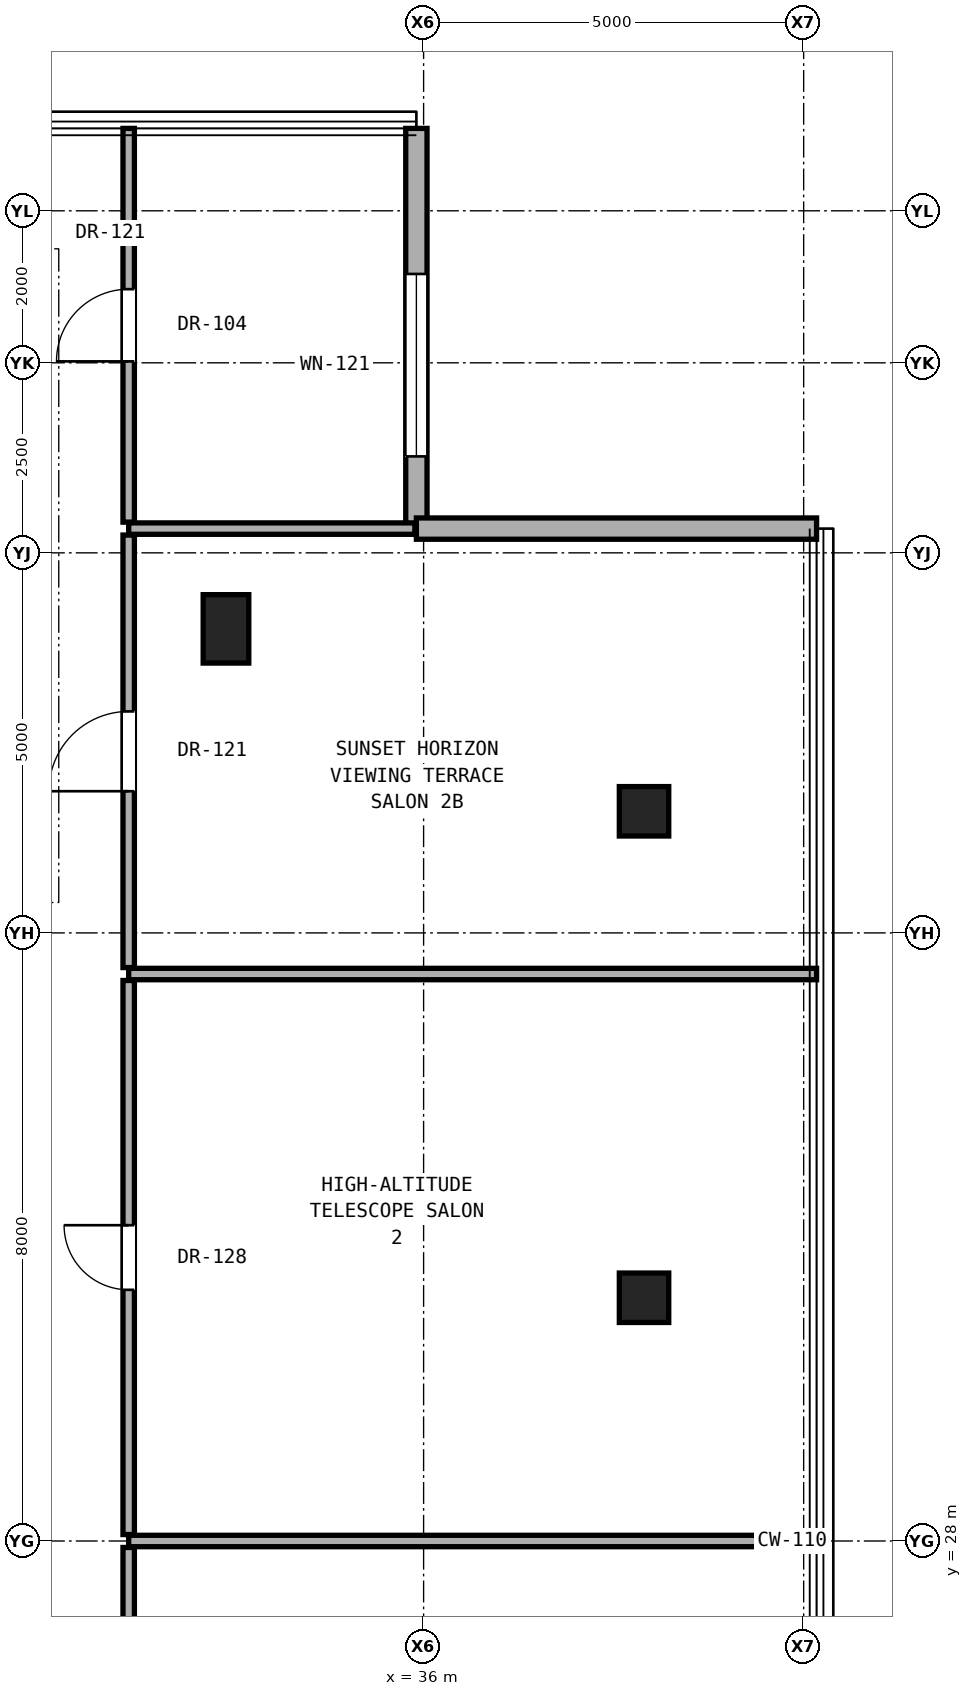
"""IFC4 building model, lengths in metres.
Left out: names, types, materials, properties, quantities, classifications, styles, units other than length and angle.
Written with IfcOpenShell. Run it as: python <this file> out.ifc"""

import sys

from ifc_helpers import new_model, si_unit, direction, frame, frame_2d, origin, origin_2d, place, context, subcontext, project, spatial, rectangle, hollow_rectangle, extrude, element, fill, save


model = new_model("IFC4")
c1 = context("Model", 3, precision=1e-05, world=origin(), true_north=direction((0.0, 1.0)))
c2 = subcontext(c1, "Body", "Model", "MODEL_VIEW")
j1 = project(units=[si_unit("LENGTHUNIT", "METRE"), si_unit("PLANEANGLEUNIT", "RADIAN")], contexts=[c1])
p1 = place(None, origin())
s1 = spatial("IfcSite", under=j1, at=p1, CompositionType="ELEMENT")
p2 = place(p1, origin())
s2 = spatial("IfcBuilding", under=s1, at=p2, CompositionType="ELEMENT")
p3 = place(p2, frame((0.0, 0.0, 259.9)))
s3 = spatial("IfcBuildingStorey", under=s2, at=p3, CompositionType="ELEMENT", Elevation=259.9)
for number, where, z_axis, x_axis in (
    (1, (38.9, 31.2, 0.0), (0.0, 0.0, 1.0), (1.0, 0.0, 0.0)),
    (2, (38.9, 37.6, 0.0), (0.0, 0.0, 1.0), (1.0, 0.0, 0.0)),
):
    element("IfcColumn", number, at=place(p3, frame(where, z_axis=z_axis, x_axis=x_axis)), inside=s3, PredefinedType="COLUMN", context=c2, shape_type="SweptSolid", body=[
        extrude(hollow_rectangle(XDim=0.65, YDim=0.65, WallThickness=0.036, at=origin_2d()), origin(), (0.0, 0.0, 1.0), 3.6),
    ])
p4 = place(p3, frame((33.4, 40.0, 0.0), z_axis=(0.0, 0.0, 1.0), x_axis=(1.0, 0.0, 0.0)))
e3 = element("IfcColumn", 3, at=p4, inside=s3, PredefinedType="PILASTER", context=c2, shape_type="SweptSolid", body=[
    extrude(rectangle(XDim=0.6, YDim=0.9, at=origin_2d()), origin(), (0.0, 0.0, 1.0), 3.6),
])
p5 = place(p3, frame((35.905, 41.319, 0.0), z_axis=(0.0, 0.0, 1.0), x_axis=(0.0, 1.0, 0.0)))
e4 = element("IfcWall", 4, at=p5, inside=s3, PredefinedType="SOLIDWALL", context=c2, shape_type="SweptSolid", body=[
    extrude(rectangle(XDim=5.265, YDim=0.28, at=frame_2d((2.632, 0.0))), origin(), (0.0, 0.0, 1.0), 2.93),
])
p6 = place(p5, frame((0.95, 0.0, 0.43)))
e5 = element("IfcOpeningElement", 5, at=p6, cuts=e4, PredefinedType="OPENING", context=c2, shape_type="SweptSolid", body=[
    extrude(rectangle(XDim=2.4, YDim=2.35, at=frame_2d((1.2, 1.175))), frame((0.0, 0.15, 0.0), z_axis=(0.0, -1.0, 0.0), x_axis=(1.0, 0.0, 0.0)), (0.0, 0.0, 1.0), 0.3),
])
p7 = place(p3, frame((41.17, 41.319, 0.0), z_axis=(0.0, 0.0, 1.0), x_axis=(-1.0, 0.0, 0.0)))
e6 = element("IfcWall", 6, at=p7, inside=s3, PredefinedType="SOLIDWALL", context=c2, shape_type="SweptSolid", body=[
    extrude(rectangle(XDim=5.265, YDim=0.28, at=frame_2d((2.632, 0.0))), origin(), (0.0, 0.0, 1.0), 2.93),
])
for number, where, z_axis, x_axis in (
    (7, (32.12, 28.0, 0.0), (0.0, 0.0, 1.0), (1.0, 0.0, 0.0)),
    (8, (32.12, 35.459, 0.0), (0.0, 0.0, 1.0), (1.0, 0.0, 0.0)),
):
    element("IfcWall", number, at=place(p3, frame(where, z_axis=z_axis, x_axis=x_axis)), inside=s3, PredefinedType="PARTITIONING", context=c2, shape_type="SweptSolid", body=[
        extrude(rectangle(XDim=9.05, YDim=0.15, at=frame_2d((4.525, 0.0))), origin(), (0.0, 0.0, 1.0), 2.169),
    ])
p8 = place(p3, frame((32.12, 41.319, 0.0), z_axis=(0.0, 0.0, 1.0), x_axis=(1.0, 0.0, 0.0)))
e9 = element("IfcWall", 9, at=p8, inside=s3, PredefinedType="PARTITIONING", context=c2, shape_type="SweptSolid", body=[
    extrude(rectangle(XDim=3.765, YDim=0.15, at=frame_2d((1.882, 0.0))), origin(), (0.0, 0.0, 1.0), 2.95),
])
p9 = place(p3, frame((32.12, 22.225, 0.0), z_axis=(0.0, 0.0, 1.0), x_axis=(0.0, 1.0, 0.0)))
e10 = element("IfcWall", 10, at=p9, inside=s3, PredefinedType="PARTITIONING", context=c2, shape_type="SweptSolid", body=[
    extrude(rectangle(XDim=5.69, YDim=0.15, at=frame_2d((2.845, 0.0))), origin(), (0.0, 0.0, 1.0), 2.246),
])
p10 = place(p9, frame((2.32, 0.0, 0.0)))
e11 = element("IfcOpeningElement", 11, at=p10, cuts=e10, PredefinedType="OPENING", context=c2, shape_type="SweptSolid", body=[
    extrude(rectangle(XDim=1.05, YDim=2.2, at=frame_2d((0.525, 1.1))), frame((0.0, 0.085, 0.0), z_axis=(0.0, -1.0, 0.0), x_axis=(1.0, 0.0, 0.0)), (0.0, 0.0, 1.0), 0.17),
])
p11 = place(p3, frame((32.12, 28.085, 0.0), z_axis=(0.0, 0.0, 1.0), x_axis=(0.0, 1.0, 0.0)))
e12 = element("IfcWall", 12, at=p11, inside=s3, PredefinedType="PARTITIONING", context=c2, shape_type="SweptSolid", body=[
    extrude(rectangle(XDim=7.289, YDim=0.15, at=frame_2d((3.645, 0.0))), origin(), (0.0, 0.0, 1.0), 2.246),
])
p12 = place(p11, frame((3.219, 0.0, 0.0)))
e13 = element("IfcOpeningElement", 13, at=p12, cuts=e12, PredefinedType="OPENING", context=c2, shape_type="SweptSolid", body=[
    extrude(rectangle(XDim=0.85, YDim=2.01, at=frame_2d((0.425, 1.005))), frame((0.0, 0.085, 0.0), z_axis=(0.0, -1.0, 0.0), x_axis=(1.0, 0.0, 0.0)), (0.0, 0.0, 1.0), 0.17),
])
p13 = place(p3, frame((32.12, 35.544, 0.0), z_axis=(0.0, 0.0, 1.0), x_axis=(0.0, 1.0, 0.0)))
e14 = element("IfcWall", 14, at=p13, inside=s3, PredefinedType="PARTITIONING", context=c2, shape_type="SweptSolid", body=[
    extrude(rectangle(XDim=5.69, YDim=0.15, at=frame_2d((2.845, 0.0))), origin(), (0.0, 0.0, 1.0), 2.393),
])
p14 = place(p13, frame((2.32, 0.0, 0.0)))
e15 = element("IfcOpeningElement", 15, at=p14, cuts=e14, PredefinedType="OPENING", context=c2, shape_type="SweptSolid", body=[
    extrude(rectangle(XDim=1.05, YDim=2.2, at=frame_2d((0.525, 1.1))), frame((0.0, 0.085, 0.0), z_axis=(0.0, -1.0, 0.0), x_axis=(1.0, 0.0, 0.0)), (0.0, 0.0, 1.0), 0.17),
])
p15 = place(p3, frame((32.12, 41.404, 0.0), z_axis=(0.0, 0.0, 1.0), x_axis=(0.0, 1.0, 0.0)))
e16 = element("IfcWall", 16, at=p15, inside=s3, PredefinedType="PARTITIONING", context=c2, shape_type="SweptSolid", body=[
    extrude(rectangle(XDim=5.18, YDim=0.15, at=frame_2d((2.59, 0.0))), origin(), (0.0, 0.0, 1.0), 2.95),
])
p16 = place(p15, frame((2.115, 0.0, 0.0)))
e17 = element("IfcOpeningElement", 17, at=p16, cuts=e16, PredefinedType="OPENING", context=c2, shape_type="SweptSolid", body=[
    extrude(rectangle(XDim=0.95, YDim=2.15, at=frame_2d((0.475, 1.075))), frame((0.0, 0.085, 0.0), z_axis=(0.0, -1.0, 0.0), x_axis=(1.0, 0.0, 0.0)), (0.0, 0.0, 1.0), 0.17),
])
p17 = place(p6, origin())
e18 = element("IfcWindow", 18, at=p17, inside=s3, PartitioningType="SINGLE_PANEL", PredefinedType="WINDOW", context=c2, shape_type="SweptSolid", body=[
    extrude(rectangle(XDim=2.4, YDim=2.35, at=frame_2d((1.2, 1.175))), frame((0.0, 0.03, 0.0), z_axis=(0.0, -1.0, 0.0), x_axis=(1.0, 0.0, 0.0)), (0.0, 0.0, 1.0), 0.06),
])
fill(e5, e18)
p18 = place(p12, origin())
e19 = element("IfcDoor", 19, at=p18, inside=s3, OperationType="SINGLE_SWING_RIGHT", PredefinedType="DOOR", context=c2, shape_type="SweptSolid", body=[
    extrude(rectangle(XDim=0.85, YDim=2.01, at=frame_2d((0.425, 1.005))), frame((0.0, 0.025, 0.0), z_axis=(0.0, -1.0, 0.0), x_axis=(1.0, 0.0, 0.0)), (0.0, 0.0, 1.0), 0.05),
])
fill(e13, e19)
p19 = place(p14, origin())
e20 = element("IfcDoor", 20, at=p19, inside=s3, OperationType="SINGLE_SWING_LEFT", PredefinedType="DOOR", context=c2, shape_type="SweptSolid", body=[
    extrude(rectangle(XDim=1.05, YDim=2.2, at=frame_2d((0.525, 1.1))), frame((0.0, 0.025, 0.0), z_axis=(0.0, -1.0, 0.0), x_axis=(1.0, 0.0, 0.0)), (0.0, 0.0, 1.0), 0.05),
])
fill(e15, e20)
p20 = place(p16, origin())
e21 = element("IfcDoor", 21, at=p20, inside=s3, OperationType="SINGLE_SWING_LEFT", PredefinedType="DOOR", context=c2, shape_type="SweptSolid", body=[
    extrude(rectangle(XDim=0.95, YDim=2.15, at=frame_2d((0.475, 1.075))), frame((0.0, 0.025, 0.0), z_axis=(0.0, -1.0, 0.0), x_axis=(1.0, 0.0, 0.0)), (0.0, 0.0, 1.0), 0.05),
])
fill(e17, e21)
save(model, sys.argv[1])
